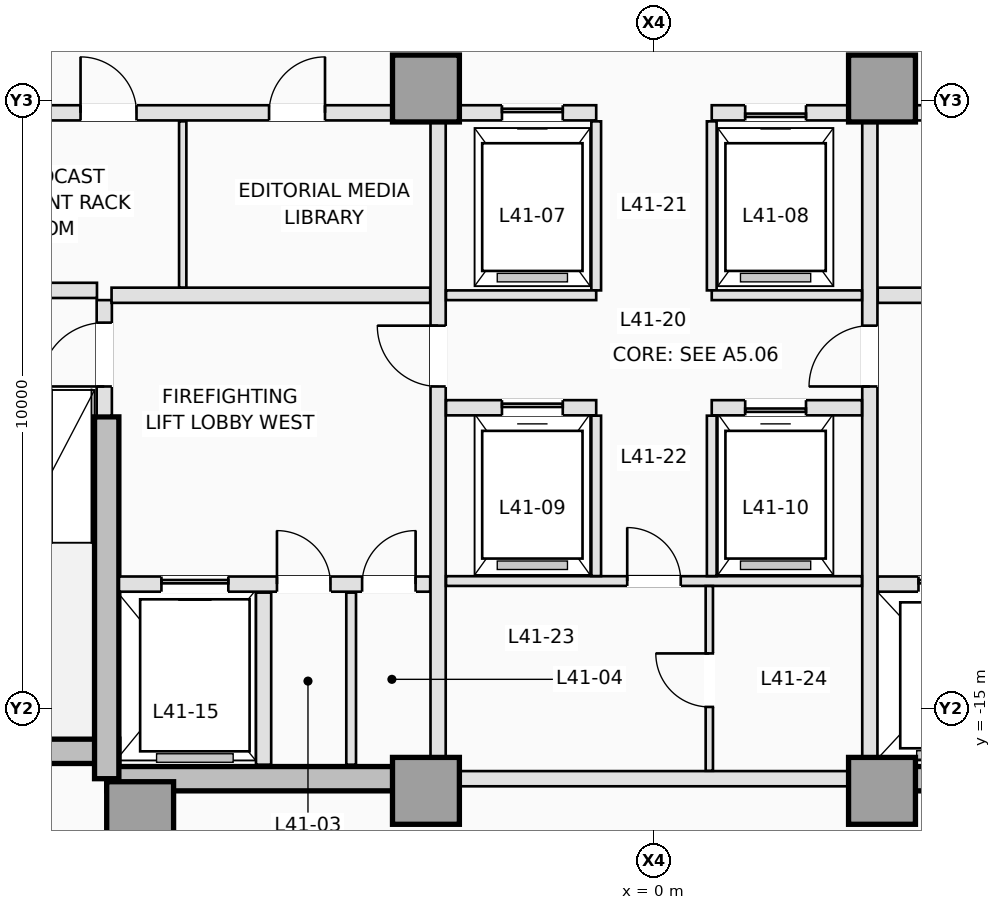
"""IFC4 building model, lengths in metres.
Left out: names, types, materials, properties, quantities, classifications, styles, units other than length and angle.
Written with IfcOpenShell. Run it as: python <this file> out.ifc"""

import sys

from ifc_helpers import new_model, si_unit, direction, frame, frame_2d, origin, origin_2d, place, context, subcontext, project, spatial, rectangle, extrude, element, fill, save


model = new_model("IFC4")
c1 = context("Model", 3, precision=1e-05, world=origin(), true_north=direction((0.0, 1.0)))
c2 = subcontext(c1, "Body", "Model", "MODEL_VIEW")
j1 = project(units=[si_unit("LENGTHUNIT", "METRE"), si_unit("PLANEANGLEUNIT", "RADIAN")], contexts=[c1])
p1 = place(None, origin())
s1 = spatial("IfcSite", under=j1, at=p1, CompositionType="ELEMENT")
p2 = place(p1, origin())
s2 = spatial("IfcBuilding", under=s1, at=p2, CompositionType="ELEMENT")
p3 = place(p2, frame((0.0, 0.0, 151.0)))
s3 = spatial("IfcBuildingStorey", under=s2, at=p3, CompositionType="ELEMENT", Elevation=151.0)
p4 = place(p3, frame((-12.6, -15.7, 0.0), z_axis=(0.0, 0.0, 1.0), x_axis=(1.0, 0.0, 0.0)))
e1 = element("IfcWall", 1, at=p4, inside=s3, PredefinedType="SHEAR", context=c2, shape_type="SweptSolid", body=[
    extrude(rectangle(XDim=3.8, YDim=0.4, at=frame_2d((1.9, 0.0))), origin(), (0.0, 0.0, 1.0), 3.5),
])
for number, where, z_axis, x_axis in (
    (2, (-9.0, -16.15, 0.0), (0.0, 0.0, 1.0), (1.0, 0.0, 0.0)),
    (3, (3.75, -16.15, 0.0), (0.0, 0.0, 1.0), (1.0, 0.0, 0.0)),
):
    element("IfcWall", number, at=place(p3, frame(where, z_axis=z_axis, x_axis=x_axis)), inside=s3, PredefinedType="SHEAR", context=c2, shape_type="SweptSolid", body=[
        extrude(rectangle(XDim=5.25, YDim=0.4, at=frame_2d((2.625, 0.0))), origin(), (0.0, 0.0, 1.0), 3.5),
    ])
p5 = place(p3, frame((-9.0, -16.15, 0.0), z_axis=(0.0, 0.0, 1.0), x_axis=(0.0, 1.0, 0.0)))
e4 = element("IfcWall", 4, at=p5, inside=s3, PredefinedType="SHEAR", context=c2, shape_type="SweptSolid", body=[
    extrude(rectangle(XDim=5.95, YDim=0.4, at=frame_2d((2.975, 0.0))), origin(), (0.0, 0.0, 1.0), 3.5),
])
for number, where, z_axis, x_axis in (
    (5, (-8.45, -16.75, 0.0), (0.0, 0.0, 1.0), (1.0, 0.0, 0.0)),
    (6, (-3.75, -16.35, 0.0), (0.0, 0.0, 1.0), (1.0, 0.0, 0.0)),
    (7, (3.75, -16.35, 0.0), (0.0, 0.0, 1.0), (1.0, 0.0, 0.0)),
    (8, (-3.75, -4.8, 0.0), (0.0, 0.0, 1.0), (1.0, 0.0, 0.0)),
    (9, (3.75, -4.8, 0.0), (0.0, 0.0, 1.0), (1.0, 0.0, 0.0)),
):
    element("IfcColumn", number, at=place(p3, frame(where, z_axis=z_axis, x_axis=x_axis)), inside=s3, PredefinedType="COLUMN", context=c2, shape_type="SweptSolid", body=[
        extrude(rectangle(XDim=1.1, YDim=1.1, at=origin_2d()), origin(), (0.0, 0.0, 1.0), 3.5),
    ])
p6 = place(p3, frame((-9.04, -10.18, 0.0), z_axis=(0.0, 0.0, 1.0), x_axis=(0.0, 1.0, 0.0)))
e10 = element("IfcWall", 10, at=p6, inside=s3, PredefinedType="PARTITIONING", context=c2, shape_type="SweptSolid", body=[
    extrude(rectangle(XDim=1.9, YDim=0.25, at=frame_2d((0.95, 0.0))), origin(), (0.0, 0.0, 1.0), 3.25),
])
p7 = place(p6, frame((0.48, 0.0, 0.0)))
e11 = element("IfcOpeningElement", 11, at=p7, cuts=e10, PredefinedType="OPENING", context=c2, shape_type="SweptSolid", body=[
    extrude(rectangle(XDim=1.05, YDim=2.15, at=frame_2d((0.525, 1.075))), frame((0.0, 0.135, 0.0), z_axis=(0.0, -1.0, 0.0), x_axis=(1.0, 0.0, 0.0)), (0.0, 0.0, 1.0), 0.27),
])
p8 = place(p3, frame((-12.38, -8.12, 0.0), z_axis=(0.0, 0.0, 1.0), x_axis=(1.0, 0.0, 0.0)))
e12 = element("IfcWall", 12, at=p8, inside=s3, PredefinedType="PARTITIONING", context=c2, shape_type="SweptSolid", body=[
    extrude(rectangle(XDim=3.22, YDim=0.25, at=frame_2d((1.61, 0.0))), origin(), (0.0, 0.0, 1.0), 3.25),
])
p9 = place(p3, frame((-8.798, -12.95, 0.0), z_axis=(0.0, 0.0, 1.0), x_axis=(1.0, 0.0, 0.0)))
e13 = element("IfcWall", 13, at=p9, inside=s3, PredefinedType="PARTITIONING", context=c2, shape_type="SweptSolid", body=[
    extrude(rectangle(XDim=5.118, YDim=0.25, at=frame_2d((2.559, 0.0))), origin(), (0.0, 0.0, 1.0), 3.25),
])
p10 = place(p9, frame((0.698, 0.0, 0.0)))
e14 = element("IfcOpeningElement", 14, at=p10, cuts=e13, PredefinedType="OPENING", context=c2, shape_type="SweptSolid", body=[
    extrude(rectangle(XDim=1.1, YDim=2.15, at=frame_2d((0.55, 1.075))), frame((0.0, 0.135, 0.0), z_axis=(0.0, -1.0, 0.0), x_axis=(1.0, 0.0, 0.0)), (0.0, 0.0, 1.0), 0.27),
])
p11 = place(p9, frame((2.598, 0.0, 0.0)))
e15 = element("IfcOpeningElement", 15, at=p11, cuts=e13, PredefinedType="OPENING", context=c2, shape_type="SweptSolid", body=[
    extrude(rectangle(XDim=0.88, YDim=2.1, at=frame_2d((0.44, 1.05))), frame((0.0, 0.135, 0.0), z_axis=(0.0, -1.0, 0.0), x_axis=(1.0, 0.0, 0.0)), (0.0, 0.0, 1.0), 0.27),
])
p12 = place(p9, frame((3.998, 0.0, 0.0)))
e16 = element("IfcOpeningElement", 16, at=p12, cuts=e13, PredefinedType="OPENING", context=c2, shape_type="SweptSolid", body=[
    extrude(rectangle(XDim=0.88, YDim=2.1, at=frame_2d((0.44, 1.05))), frame((0.0, 0.135, 0.0), z_axis=(0.0, -1.0, 0.0), x_axis=(1.0, 0.0, 0.0)), (0.0, 0.0, 1.0), 0.27),
])
p13 = place(p3, frame((3.68, -12.95, 0.0), z_axis=(0.0, 0.0, 1.0), x_axis=(1.0, 0.0, 0.0)))
e17 = element("IfcWall", 17, at=p13, inside=s3, PredefinedType="PARTITIONING", context=c2, shape_type="SweptSolid", body=[
    extrude(rectangle(XDim=5.118, YDim=0.25, at=frame_2d((2.559, 0.0))), origin(), (0.0, 0.0, 1.0), 3.25),
])
p14 = place(p13, frame((3.32, 0.0, 0.0)))
e18 = element("IfcOpeningElement", 18, at=p14, cuts=e17, PredefinedType="OPENING", context=c2, shape_type="SweptSolid", body=[
    extrude(rectangle(XDim=1.1, YDim=2.15, at=frame_2d((0.55, 1.075))), frame((0.0, 0.135, 0.0), z_axis=(0.0, -1.0, 0.0), x_axis=(1.0, 0.0, 0.0)), (0.0, 0.0, 1.0), 0.27),
])
p15 = place(p13, frame((0.67, 0.0, 0.0)))
e19 = element("IfcOpeningElement", 19, at=p15, cuts=e17, PredefinedType="OPENING", context=c2, shape_type="SweptSolid", body=[
    extrude(rectangle(XDim=1.2, YDim=2.15, at=frame_2d((0.6, 1.075))), frame((0.0, 0.135, 0.0), z_axis=(0.0, -1.0, 0.0), x_axis=(1.0, 0.0, 0.0)), (0.0, 0.0, 1.0), 0.27),
])
p16 = place(p3, frame((-6.42, -15.92, 0.0), z_axis=(0.0, 0.0, 1.0), x_axis=(0.0, 1.0, 0.0)))
e20 = element("IfcWall", 20, at=p16, inside=s3, PredefinedType="PARTITIONING", context=c2, shape_type="SweptSolid", body=[
    extrude(rectangle(XDim=2.83, YDim=0.25, at=frame_2d((1.415, 0.0))), origin(), (0.0, 0.0, 1.0), 3.25),
])
p17 = place(p3, frame((-4.98, -15.92, 0.0), z_axis=(0.0, 0.0, 1.0), x_axis=(0.0, 1.0, 0.0)))
e21 = element("IfcWall", 21, at=p17, inside=s3, PredefinedType="PARTITIONING", context=c2, shape_type="SweptSolid", body=[
    extrude(rectangle(XDim=2.83, YDim=0.16, at=frame_2d((1.415, 0.0))), origin(), (0.0, 0.0, 1.0), 3.25),
])
for number, where, z_axis, x_axis in (
    (22, (-8.92, -8.2, 0.0), (0.0, 0.0, 1.0), (1.0, 0.0, 0.0)),
    (23, (3.68, -8.2, 0.0), (0.0, 0.0, 1.0), (1.0, 0.0, 0.0)),
):
    element("IfcWall", number, at=place(p3, frame(where, z_axis=z_axis, x_axis=x_axis)), inside=s3, PredefinedType="PARTITIONING", context=c2, shape_type="SweptSolid", body=[
        extrude(rectangle(XDim=5.24, YDim=0.25, at=frame_2d((2.62, 0.0))), origin(), (0.0, 0.0, 1.0), 3.25),
    ])
p18 = place(p3, frame((-3.55, -15.798, 0.0), z_axis=(0.0, 0.0, 1.0), x_axis=(0.0, 1.0, 0.0)))
e24 = element("IfcWall", 24, at=p18, inside=s3, PredefinedType="PARTITIONING", context=c2, shape_type="SweptSolid", body=[
    extrude(rectangle(XDim=10.446, YDim=0.25, at=frame_2d((5.223, 0.0))), origin(), (0.0, 0.0, 1.0), 3.25),
])
p19 = place(p18, frame((6.098, 0.0, 0.0)))
e25 = element("IfcOpeningElement", 25, at=p19, cuts=e24, PredefinedType="OPENING", context=c2, shape_type="SweptSolid", body=[
    extrude(rectangle(XDim=1.0, YDim=2.15, at=frame_2d((0.5, 1.075))), frame((0.0, 0.135, 0.0), z_axis=(0.0, -1.0, 0.0), x_axis=(1.0, 0.0, 0.0)), (0.0, 0.0, 1.0), 0.27),
])
p20 = place(p3, frame((3.55, -15.798, 0.0), z_axis=(0.0, 0.0, 1.0), x_axis=(0.0, 1.0, 0.0)))
e26 = element("IfcWall", 26, at=p20, inside=s3, PredefinedType="PARTITIONING", context=c2, shape_type="SweptSolid", body=[
    extrude(rectangle(XDim=10.446, YDim=0.25, at=frame_2d((5.223, 0.0))), origin(), (0.0, 0.0, 1.0), 3.25),
])
p21 = place(p20, frame((6.098, 0.0, 0.0)))
e27 = element("IfcOpeningElement", 27, at=p21, cuts=e26, PredefinedType="OPENING", context=c2, shape_type="SweptSolid", body=[
    extrude(rectangle(XDim=1.0, YDim=2.15, at=frame_2d((0.5, 1.075))), frame((0.0, 0.135, 0.0), z_axis=(0.0, -1.0, 0.0), x_axis=(1.0, 0.0, 0.0)), (0.0, 0.0, 1.0), 0.27),
])
p22 = place(p3, frame((-12.398, -5.2, 0.0), z_axis=(0.0, 0.0, 1.0), x_axis=(1.0, 0.0, 0.0)))
e28 = element("IfcWall", 28, at=p22, inside=s3, PredefinedType="PARTITIONING", context=c2, shape_type="SweptSolid", body=[
    extrude(rectangle(XDim=8.096, YDim=0.25, at=frame_2d((4.048, 0.0))), origin(), (0.0, 0.0, 1.0), 3.25),
])
p23 = place(p22, frame((2.968, 0.0, 0.0)))
e29 = element("IfcOpeningElement", 29, at=p23, cuts=e28, PredefinedType="OPENING", context=c2, shape_type="SweptSolid", body=[
    extrude(rectangle(XDim=0.92, YDim=2.12, at=frame_2d((0.46, 1.06))), frame((0.0, 0.135, 0.0), z_axis=(0.0, -1.0, 0.0), x_axis=(1.0, 0.0, 0.0)), (0.0, 0.0, 1.0), 0.27),
])
p24 = place(p22, frame((6.068, 0.0, 0.0)))
e30 = element("IfcOpeningElement", 30, at=p24, cuts=e28, PredefinedType="OPENING", context=c2, shape_type="SweptSolid", body=[
    extrude(rectangle(XDim=0.92, YDim=2.12, at=frame_2d((0.46, 1.06))), frame((0.0, 0.135, 0.0), z_axis=(0.0, -1.0, 0.0), x_axis=(1.0, 0.0, 0.0)), (0.0, 0.0, 1.0), 0.27),
])
p25 = place(p3, frame((4.302, -5.2, 0.0), z_axis=(0.0, 0.0, 1.0), x_axis=(1.0, 0.0, 0.0)))
e31 = element("IfcWall", 31, at=p25, inside=s3, PredefinedType="PARTITIONING", context=c2, shape_type="SweptSolid", body=[
    extrude(rectangle(XDim=8.096, YDim=0.25, at=frame_2d((4.048, 0.0))), origin(), (0.0, 0.0, 1.0), 3.25),
])
p26 = place(p3, frame((-3.198, -5.2, 0.0), z_axis=(0.0, 0.0, 1.0), x_axis=(1.0, 0.0, 0.0)))
e32 = element("IfcWall", 32, at=p26, inside=s3, PredefinedType="PARTITIONING", context=c2, shape_type="SweptSolid", body=[
    extrude(rectangle(XDim=2.248, YDim=0.25, at=frame_2d((1.124, 0.0))), origin(), (0.0, 0.0, 1.0), 3.25),
])
p27 = place(p26, frame((0.698, 0.0, 0.0)))
e33 = element("IfcOpeningElement", 33, at=p27, cuts=e32, PredefinedType="OPENING", context=c2, shape_type="SweptSolid", body=[
    extrude(rectangle(XDim=1.0, YDim=2.15, at=frame_2d((0.5, 1.075))), frame((0.0, 0.135, 0.0), z_axis=(0.0, -1.0, 0.0), x_axis=(1.0, 0.0, 0.0)), (0.0, 0.0, 1.0), 0.27),
])
p28 = place(p3, frame((0.95, -5.2, 0.0), z_axis=(0.0, 0.0, 1.0), x_axis=(1.0, 0.0, 0.0)))
e34 = element("IfcWall", 34, at=p28, inside=s3, PredefinedType="PARTITIONING", context=c2, shape_type="SweptSolid", body=[
    extrude(rectangle(XDim=2.248, YDim=0.25, at=frame_2d((1.124, 0.0))), origin(), (0.0, 0.0, 1.0), 3.25),
])
p29 = place(p28, frame((0.55, 0.0, 0.0)))
e35 = element("IfcOpeningElement", 35, at=p29, cuts=e34, PredefinedType="OPENING", context=c2, shape_type="SweptSolid", body=[
    extrude(rectangle(XDim=1.0, YDim=2.15, at=frame_2d((0.5, 1.075))), frame((0.0, 0.135, 0.0), z_axis=(0.0, -1.0, 0.0), x_axis=(1.0, 0.0, 0.0)), (0.0, 0.0, 1.0), 0.27),
])
p30 = place(p3, frame((-7.75, -8.073, 0.0), z_axis=(0.0, 0.0, 1.0), x_axis=(0.0, 1.0, 0.0)))
e36 = element("IfcWall", 36, at=p30, inside=s3, PredefinedType="PARTITIONING", context=c2, shape_type="SweptSolid", body=[
    extrude(rectangle(XDim=2.733, YDim=0.12, at=frame_2d((1.366, 0.0))), origin(), (0.0, 0.0, 1.0), 3.25),
])
p31 = place(p3, frame((-3.198, -16.15, 0.0), z_axis=(0.0, 0.0, 1.0), x_axis=(1.0, 0.0, 0.0)))
e37 = element("IfcWall", 37, at=p31, inside=s3, PredefinedType="PARTITIONING", context=c2, shape_type="SweptSolid", body=[
    extrude(rectangle(XDim=6.396, YDim=0.25, at=frame_2d((3.198, 0.0))), origin(), (0.0, 0.0, 1.0), 2.45),
])
for number, where, z_axis, x_axis in (
    (38, (-0.95, -8.12, 0.0), (0.0, 0.0, 1.0), (0.0, 1.0, 0.0)),
    (39, (0.95, -8.12, 0.0), (0.0, 0.0, 1.0), (0.0, 1.0, 0.0)),
):
    element("IfcWall", number, at=place(p3, frame(where, z_axis=z_axis, x_axis=x_axis)), inside=s3, PredefinedType="PARTITIONING", context=c2, shape_type="SweptSolid", body=[
        extrude(rectangle(XDim=2.78, YDim=0.16, at=frame_2d((1.39, 0.0))), origin(), (0.0, 0.0, 1.0), 3.25),
    ])
for number, where, z_axis, x_axis in (
    (40, (-3.42, -8.2, 0.0), (0.0, 0.0, 1.0), (1.0, 0.0, 0.0)),
    (41, (0.95, -8.2, 0.0), (0.0, 0.0, 1.0), (1.0, 0.0, 0.0)),
):
    element("IfcWall", number, at=place(p3, frame(where, z_axis=z_axis, x_axis=x_axis)), inside=s3, PredefinedType="PARTITIONING", context=c2, shape_type="SweptSolid", body=[
        extrude(rectangle(XDim=2.47, YDim=0.16, at=frame_2d((1.235, 0.0))), origin(), (0.0, 0.0, 1.0), 3.25),
    ])
p32 = place(p3, frame((-3.42, -10.05, 0.0), z_axis=(0.0, 0.0, 1.0), x_axis=(1.0, 0.0, 0.0)))
e42 = element("IfcWall", 42, at=p32, inside=s3, PredefinedType="PARTITIONING", context=c2, shape_type="SweptSolid", body=[
    extrude(rectangle(XDim=2.47, YDim=0.25, at=frame_2d((1.235, 0.0))), origin(), (0.0, 0.0, 1.0), 3.25),
])
p33 = place(p32, frame((0.92, 0.0, 0.0)))
e43 = element("IfcOpeningElement", 43, at=p33, cuts=e42, PredefinedType="OPENING", context=c2, shape_type="SweptSolid", body=[
    extrude(rectangle(XDim=1.0, YDim=2.15, at=frame_2d((0.5, 1.075))), frame((0.0, 0.135, 0.0), z_axis=(0.0, -1.0, 0.0), x_axis=(1.0, 0.0, 0.0)), (0.0, 0.0, 1.0), 0.27),
])
p34 = place(p3, frame((0.95, -10.05, 0.0), z_axis=(0.0, 0.0, 1.0), x_axis=(1.0, 0.0, 0.0)))
e44 = element("IfcWall", 44, at=p34, inside=s3, PredefinedType="PARTITIONING", context=c2, shape_type="SweptSolid", body=[
    extrude(rectangle(XDim=2.47, YDim=0.25, at=frame_2d((1.235, 0.0))), origin(), (0.0, 0.0, 1.0), 3.25),
])
p35 = place(p34, frame((0.55, 0.0, 0.0)))
e45 = element("IfcOpeningElement", 45, at=p35, cuts=e44, PredefinedType="OPENING", context=c2, shape_type="SweptSolid", body=[
    extrude(rectangle(XDim=1.0, YDim=2.15, at=frame_2d((0.5, 1.075))), frame((0.0, 0.135, 0.0), z_axis=(0.0, -1.0, 0.0), x_axis=(1.0, 0.0, 0.0)), (0.0, 0.0, 1.0), 0.27),
])
p36 = place(p3, frame((-3.42, -12.9, 0.0), z_axis=(0.0, 0.0, 1.0), x_axis=(1.0, 0.0, 0.0)))
e46 = element("IfcWall", 46, at=p36, inside=s3, PredefinedType="PARTITIONING", context=c2, shape_type="SweptSolid", body=[
    extrude(rectangle(XDim=6.84, YDim=0.16, at=frame_2d((3.42, 0.0))), origin(), (0.0, 0.0, 1.0), 3.25),
])
p37 = place(p36, frame((2.98, 0.0, 0.0)))
e47 = element("IfcOpeningElement", 47, at=p37, cuts=e46, PredefinedType="OPENING", context=c2, shape_type="SweptSolid", body=[
    extrude(rectangle(XDim=0.88, YDim=2.12, at=frame_2d((0.44, 1.06))), frame((0.0, 0.09, 0.0), z_axis=(0.0, -1.0, 0.0), x_axis=(1.0, 0.0, 0.0)), (0.0, 0.0, 1.0), 0.18),
])
for number, where, z_axis, x_axis in (
    (48, (-0.95, -12.818, 0.0), (0.0, 0.0, 1.0), (0.0, 1.0, 0.0)),
    (49, (0.95, -12.818, 0.0), (0.0, 0.0, 1.0), (0.0, 1.0, 0.0)),
):
    element("IfcWall", number, at=place(p3, frame(where, z_axis=z_axis, x_axis=x_axis)), inside=s3, PredefinedType="PARTITIONING", context=c2, shape_type="SweptSolid", body=[
        extrude(rectangle(XDim=2.638, YDim=0.16, at=frame_2d((1.319, 0.0))), origin(), (0.0, 0.0, 1.0), 3.25),
    ])
p38 = place(p3, frame((0.91, -16.02, 0.0), z_axis=(0.0, 0.0, 1.0), x_axis=(0.0, 1.0, 0.0)))
e50 = element("IfcWall", 50, at=p38, inside=s3, PredefinedType="PARTITIONING", context=c2, shape_type="SweptSolid", body=[
    extrude(rectangle(XDim=3.038, YDim=0.12, at=frame_2d((1.519, 0.0))), origin(), (0.0, 0.0, 1.0), 3.25),
])
p39 = place(p38, frame((1.05, 0.0, 0.0)))
e51 = element("IfcOpeningElement", 51, at=p39, cuts=e50, PredefinedType="OPENING", context=c2, shape_type="SweptSolid", body=[
    extrude(rectangle(XDim=0.88, YDim=2.12, at=frame_2d((0.44, 1.06))), frame((0.0, 0.07, 0.0), z_axis=(0.0, -1.0, 0.0), x_axis=(1.0, 0.0, 0.0)), (0.0, 0.0, 1.0), 0.14),
])
p40 = place(p27, origin())
e52 = element("IfcDoor", 52, at=p40, inside=s3, OperationType="SLIDING_TO_LEFT", PredefinedType="DOOR", context=c2, shape_type="SweptSolid", body=[
    extrude(rectangle(XDim=1.0, YDim=2.15, at=frame_2d((0.5, 1.075))), frame((0.0, 0.025, 0.0), z_axis=(0.0, -1.0, 0.0), x_axis=(1.0, 0.0, 0.0)), (0.0, 0.0, 1.0), 0.05),
])
fill(e33, e52)
p41 = place(p29, origin())
e53 = element("IfcDoor", 53, at=p41, inside=s3, OperationType="SLIDING_TO_RIGHT", PredefinedType="DOOR", context=c2, shape_type="SweptSolid", body=[
    extrude(rectangle(XDim=1.0, YDim=2.15, at=frame_2d((0.5, 1.075))), frame((0.0, 0.025, 0.0), z_axis=(0.0, -1.0, 0.0), x_axis=(1.0, 0.0, 0.0)), (0.0, 0.0, 1.0), 0.05),
])
fill(e35, e53)
p42 = place(p10, origin())
e54 = element("IfcDoor", 54, at=p42, inside=s3, OperationType="SLIDING_TO_LEFT", PredefinedType="DOOR", context=c2, shape_type="SweptSolid", body=[
    extrude(rectangle(XDim=1.1, YDim=2.15, at=frame_2d((0.55, 1.075))), frame((0.0, 0.025, 0.0), z_axis=(0.0, -1.0, 0.0), x_axis=(1.0, 0.0, 0.0)), (0.0, 0.0, 1.0), 0.05),
])
fill(e14, e54)
p43 = place(p15, origin())
e55 = element("IfcDoor", 55, at=p43, inside=s3, OperationType="SLIDING_TO_LEFT", PredefinedType="DOOR", context=c2, shape_type="SweptSolid", body=[
    extrude(rectangle(XDim=1.2, YDim=2.15, at=frame_2d((0.6, 1.075))), frame((0.0, 0.025, 0.0), z_axis=(0.0, -1.0, 0.0), x_axis=(1.0, 0.0, 0.0)), (0.0, 0.0, 1.0), 0.05),
])
fill(e19, e55)
p44 = place(p33, origin())
e56 = element("IfcDoor", 56, at=p44, inside=s3, OperationType="SLIDING_TO_LEFT", PredefinedType="DOOR", context=c2, shape_type="SweptSolid", body=[
    extrude(rectangle(XDim=1.0, YDim=2.15, at=frame_2d((0.5, 1.075))), frame((0.0, 0.025, 0.0), z_axis=(0.0, -1.0, 0.0), x_axis=(1.0, 0.0, 0.0)), (0.0, 0.0, 1.0), 0.05),
])
fill(e43, e56)
p45 = place(p35, origin())
e57 = element("IfcDoor", 57, at=p45, inside=s3, OperationType="SLIDING_TO_RIGHT", PredefinedType="DOOR", context=c2, shape_type="SweptSolid", body=[
    extrude(rectangle(XDim=1.0, YDim=2.15, at=frame_2d((0.5, 1.075))), frame((0.0, 0.025, 0.0), z_axis=(0.0, -1.0, 0.0), x_axis=(1.0, 0.0, 0.0)), (0.0, 0.0, 1.0), 0.05),
])
fill(e45, e57)
p46 = place(p7, origin())
e58 = element("IfcDoor", 58, at=p46, inside=s3, OperationType="SINGLE_SWING_LEFT", PredefinedType="DOOR", context=c2, shape_type="SweptSolid", body=[
    extrude(rectangle(XDim=1.05, YDim=2.15, at=frame_2d((0.525, 1.075))), frame((0.0, 0.025, 0.0), z_axis=(0.0, -1.0, 0.0), x_axis=(1.0, 0.0, 0.0)), (0.0, 0.0, 1.0), 0.05),
])
fill(e11, e58)
p47 = place(p11, origin())
e59 = element("IfcDoor", 59, at=p47, inside=s3, OperationType="SINGLE_SWING_LEFT", PredefinedType="TRAPDOOR", context=c2, shape_type="SweptSolid", body=[
    extrude(rectangle(XDim=0.88, YDim=2.1, at=frame_2d((0.44, 1.05))), frame((0.0, 0.025, 0.0), z_axis=(0.0, -1.0, 0.0), x_axis=(1.0, 0.0, 0.0)), (0.0, 0.0, 1.0), 0.05),
])
fill(e15, e59)
p48 = place(p12, origin())
e60 = element("IfcDoor", 60, at=p48, inside=s3, OperationType="SINGLE_SWING_RIGHT", PredefinedType="TRAPDOOR", context=c2, shape_type="SweptSolid", body=[
    extrude(rectangle(XDim=0.88, YDim=2.1, at=frame_2d((0.44, 1.05))), frame((0.0, 0.025, 0.0), z_axis=(0.0, -1.0, 0.0), x_axis=(1.0, 0.0, 0.0)), (0.0, 0.0, 1.0), 0.05),
])
fill(e16, e60)
p49 = place(p19, origin())
e61 = element("IfcDoor", 61, at=p49, inside=s3, OperationType="SINGLE_SWING_RIGHT", PredefinedType="DOOR", context=c2, shape_type="SweptSolid", body=[
    extrude(rectangle(XDim=1.0, YDim=2.15, at=frame_2d((0.5, 1.075))), frame((0.0, 0.025, 0.0), z_axis=(0.0, -1.0, 0.0), x_axis=(1.0, 0.0, 0.0)), (0.0, 0.0, 1.0), 0.05),
])
fill(e25, e61)
p50 = place(p21, origin())
e62 = element("IfcDoor", 62, at=p50, inside=s3, OperationType="SINGLE_SWING_LEFT", PredefinedType="DOOR", context=c2, shape_type="SweptSolid", body=[
    extrude(rectangle(XDim=1.0, YDim=2.15, at=frame_2d((0.5, 1.075))), frame((0.0, 0.025, 0.0), z_axis=(0.0, -1.0, 0.0), x_axis=(1.0, 0.0, 0.0)), (0.0, 0.0, 1.0), 0.05),
])
fill(e27, e62)
p51 = place(p23, origin())
e63 = element("IfcDoor", 63, at=p51, inside=s3, OperationType="SINGLE_SWING_LEFT", PredefinedType="DOOR", context=c2, shape_type="SweptSolid", body=[
    extrude(rectangle(XDim=0.92, YDim=2.12, at=frame_2d((0.46, 1.06))), frame((0.0, 0.025, 0.0), z_axis=(0.0, -1.0, 0.0), x_axis=(1.0, 0.0, 0.0)), (0.0, 0.0, 1.0), 0.05),
])
fill(e29, e63)
p52 = place(p24, origin())
e64 = element("IfcDoor", 64, at=p52, inside=s3, OperationType="SINGLE_SWING_RIGHT", PredefinedType="DOOR", context=c2, shape_type="SweptSolid", body=[
    extrude(rectangle(XDim=0.92, YDim=2.12, at=frame_2d((0.46, 1.06))), frame((0.0, 0.025, 0.0), z_axis=(0.0, -1.0, 0.0), x_axis=(1.0, 0.0, 0.0)), (0.0, 0.0, 1.0), 0.05),
])
fill(e30, e64)
p53 = place(p37, origin())
e65 = element("IfcDoor", 65, at=p53, inside=s3, OperationType="SINGLE_SWING_LEFT", PredefinedType="DOOR", context=c2, shape_type="SweptSolid", body=[
    extrude(rectangle(XDim=0.88, YDim=2.12, at=frame_2d((0.44, 1.06))), frame((0.0, 0.025, 0.0), z_axis=(0.0, -1.0, 0.0), x_axis=(1.0, 0.0, 0.0)), (0.0, 0.0, 1.0), 0.05),
])
fill(e47, e65)
p54 = place(p39, origin())
e66 = element("IfcDoor", 66, at=p54, inside=s3, OperationType="SINGLE_SWING_RIGHT", PredefinedType="DOOR", context=c2, shape_type="SweptSolid", body=[
    extrude(rectangle(XDim=0.88, YDim=2.12, at=frame_2d((0.44, 1.06))), frame((0.0, 0.025, 0.0), z_axis=(0.0, -1.0, 0.0), x_axis=(1.0, 0.0, 0.0)), (0.0, 0.0, 1.0), 0.05),
])
fill(e51, e66)
save(model, sys.argv[1])
